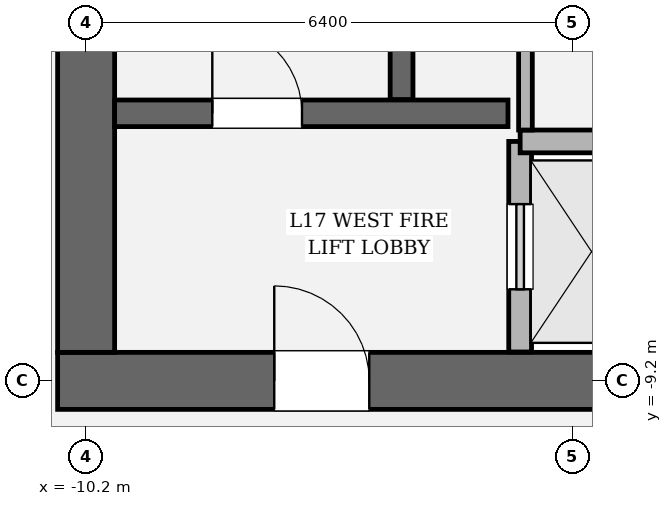
"""IFC4 building model, lengths in metres.
Left out: names, types, materials, properties, quantities, classifications, styles, units other than length and angle.
Written with IfcOpenShell. Run it as: python <this file> out.ifc"""

import sys

from ifc_helpers import new_model, si_unit, direction, frame, frame_2d, origin, place, context, subcontext, project, spatial, rectangle, extrude, element, fill, save


model = new_model("IFC4")
c1 = context("Model", 3, precision=1e-05, world=origin(), true_north=direction((0.0, 1.0)))
c2 = subcontext(c1, "Body", "Model", "MODEL_VIEW")
j1 = project(units=[si_unit("LENGTHUNIT", "METRE"), si_unit("PLANEANGLEUNIT", "RADIAN")], contexts=[c1])
p1 = place(None, origin())
s1 = spatial("IfcSite", under=j1, at=p1, CompositionType="ELEMENT")
p2 = place(p1, origin())
s2 = spatial("IfcBuilding", under=s1, at=p2, CompositionType="ELEMENT")
p3 = place(p2, frame((0.0, 0.0, 76.8)))
s3 = spatial("IfcBuildingStorey", under=s2, at=p3, CompositionType="ELEMENT", Elevation=76.8)
p4 = place(p3, frame((10.575, -9.2, 0.0), z_axis=(0.0, 0.0, 1.0), x_axis=(-1.0, 0.0, 0.0)))
e1 = element("IfcWall", 1, at=p4, inside=s3, PredefinedType="SHEAR", context=c2, shape_type="SweptSolid", body=[
    extrude(rectangle(XDim=21.15, YDim=0.75, at=frame_2d((10.575, 0.0))), origin(), (0.0, 0.0, 1.0), 4.05),
])
p5 = place(p4, frame((2.85, 0.0, 0.0)))
e2 = element("IfcOpeningElement", 2, at=p5, cuts=e1, PredefinedType="OPENING", context=c2, shape_type="SweptSolid", body=[
    extrude(rectangle(XDim=1.25, YDim=2.25, at=frame_2d((0.625, 1.125))), frame((0.0, 0.385, 0.0), z_axis=(0.0, -1.0, 0.0), x_axis=(1.0, 0.0, 0.0)), (0.0, 0.0, 1.0), 0.77),
])
p6 = place(p4, frame((17.05, 0.0, 0.0)))
e3 = element("IfcOpeningElement", 3, at=p6, cuts=e1, PredefinedType="OPENING", context=c2, shape_type="SweptSolid", body=[
    extrude(rectangle(XDim=1.25, YDim=2.25, at=frame_2d((0.625, 1.125))), frame((0.0, 0.385, 0.0), z_axis=(0.0, -1.0, 0.0), x_axis=(1.0, 0.0, 0.0)), (0.0, 0.0, 1.0), 0.77),
])
p7 = place(p3, frame((-10.2, -8.825, 0.0), z_axis=(0.0, 0.0, 1.0), x_axis=(0.0, 1.0, 0.0)))
e4 = element("IfcWall", 4, at=p7, inside=s3, PredefinedType="SHEAR", context=c2, shape_type="SweptSolid", body=[
    extrude(rectangle(XDim=17.65, YDim=0.75, at=frame_2d((8.825, 0.0))), origin(), (0.0, 0.0, 1.0), 4.05),
])
p8 = place(p7, frame((12.615, 0.0, 0.0)))
e5 = element("IfcOpeningElement", 5, at=p8, cuts=e4, PredefinedType="OPENING", context=c2, shape_type="SweptSolid", body=[
    extrude(rectangle(XDim=1.18, YDim=2.2, at=frame_2d((0.59, 1.1))), frame((0.0, 0.385, 0.0), z_axis=(0.0, -1.0, 0.0), x_axis=(1.0, 0.0, 0.0)), (0.0, 0.0, 1.0), 0.77),
])
p9 = place(p3, frame((-6.05, -5.5, 0.0), z_axis=(0.0, 0.0, 1.0), x_axis=(0.0, 1.0, 0.0)))
e6 = element("IfcWall", 6, at=p9, inside=s3, PredefinedType="SOLIDWALL", context=c2, shape_type="SweptSolid", body=[
    extrude(rectangle(XDim=8.95, YDim=0.3, at=frame_2d((4.475, 0.0))), origin(), (0.0, 0.0, 1.0), 4.05),
])
p10 = place(p3, frame((-9.825, -5.68, 0.0), z_axis=(0.0, 0.0, 1.0), x_axis=(1.0, 0.0, 0.0)))
e7 = element("IfcWall", 7, at=p10, inside=s3, PredefinedType="SOLIDWALL", context=c2, shape_type="SweptSolid", body=[
    extrude(rectangle(XDim=5.175, YDim=0.35, at=frame_2d((2.587, 0.0))), origin(), (0.0, 0.0, 1.0), 4.05),
])
p11 = place(p10, frame((1.285, 0.0, 0.0)))
e8 = element("IfcOpeningElement", 8, at=p11, cuts=e7, PredefinedType="OPENING", context=c2, shape_type="SweptSolid", body=[
    extrude(rectangle(XDim=1.18, YDim=2.2, at=frame_2d((0.59, 1.1))), frame((0.0, 0.185, 0.0), z_axis=(0.0, -1.0, 0.0), x_axis=(1.0, 0.0, 0.0)), (0.0, 0.0, 1.0), 0.37),
])
p12 = place(p3, frame((-4.49, -8.82, 0.0), z_axis=(0.0, 0.0, 1.0), x_axis=(0.0, 1.0, 0.0)))
e9 = element("IfcWall", 9, at=p12, inside=s3, PredefinedType="SOLIDWALL", context=c2, shape_type="SweptSolid", body=[
    extrude(rectangle(XDim=2.77, YDim=0.3, at=frame_2d((1.385, 0.0))), origin(), (0.0, 0.0, 1.0), 3.81),
])
p13 = place(p12, frame((0.825, 0.0, 0.0)))
e10 = element("IfcOpeningElement", 10, at=p13, cuts=e9, PredefinedType="OPENING", context=c2, shape_type="SweptSolid", body=[
    extrude(rectangle(XDim=1.12, YDim=2.25, at=frame_2d((0.56, 1.125))), frame((0.0, 0.16, 0.0), z_axis=(0.0, -1.0, 0.0), x_axis=(1.0, 0.0, 0.0)), (0.0, 0.0, 1.0), 0.32),
])
p14 = place(p3, frame((-4.49, -6.05, 0.0), z_axis=(0.0, 0.0, 1.0), x_axis=(1.0, 0.0, 0.0)))
e11 = element("IfcWall", 11, at=p14, inside=s3, PredefinedType="SOLIDWALL", context=c2, shape_type="SweptSolid", body=[
    extrude(rectangle(XDim=1.88, YDim=0.3, at=frame_2d((0.94, 0.0))), origin(), (0.0, 0.0, 1.0), 3.81),
])
p15 = place(p3, frame((-4.42, -4.16, 0.0), z_axis=(0.0, 0.0, 1.0), x_axis=(0.0, -1.0, 0.0)))
e12 = element("IfcWall", 12, at=p15, inside=s3, PredefinedType="PARTITIONING", context=c2, shape_type="SweptSolid", body=[
    extrude(rectangle(XDim=1.74, YDim=0.18, at=frame_2d((0.87, 0.0))), origin(), (0.0, 0.0, 1.0), 3.81),
])
p16 = place(p11, origin())
e13 = element("IfcDoor", 13, at=p16, inside=s3, OperationType="SINGLE_SWING_LEFT", PredefinedType="DOOR", context=c2, shape_type="SweptSolid", body=[
    extrude(rectangle(XDim=1.18, YDim=2.2, at=frame_2d((0.59, 1.1))), frame((0.0, 0.025, 0.0), z_axis=(0.0, -1.0, 0.0), x_axis=(1.0, 0.0, 0.0)), (0.0, 0.0, 1.0), 0.05),
])
fill(e8, e13)
p17 = place(p6, origin())
e14 = element("IfcDoor", 14, at=p17, inside=s3, OperationType="SINGLE_SWING_RIGHT", PredefinedType="DOOR", context=c2, shape_type="SweptSolid", body=[
    extrude(rectangle(XDim=1.25, YDim=2.25, at=frame_2d((0.625, 1.125))), frame((0.0, 0.025, 0.0), z_axis=(0.0, -1.0, 0.0), x_axis=(1.0, 0.0, 0.0)), (0.0, 0.0, 1.0), 0.05),
])
fill(e3, e14)
p18 = place(p13, origin())
e15 = element("IfcDoor", 15, at=p18, inside=s3, OperationType="SLIDING_TO_LEFT", PredefinedType="DOOR", context=c2, shape_type="SweptSolid", body=[
    extrude(rectangle(XDim=1.12, YDim=2.25, at=frame_2d((0.56, 1.125))), frame((0.0, 0.025, 0.0), z_axis=(0.0, -1.0, 0.0), x_axis=(1.0, 0.0, 0.0)), (0.0, 0.0, 1.0), 0.05),
])
fill(e10, e15)
save(model, sys.argv[1])
